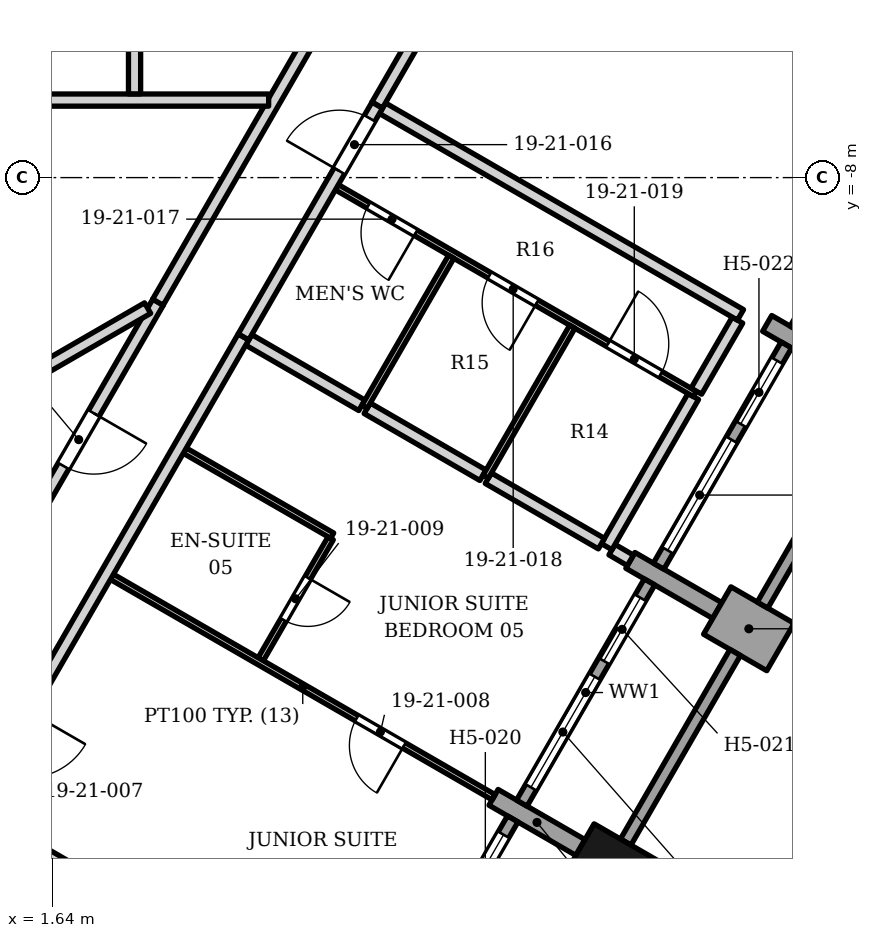
"""IFC4 building model, lengths in metres.
Left out: names, types, materials, properties, quantities, classifications, styles, units other than length and angle.
Written with IfcOpenShell. Run it as: python <this file> out.ifc"""

import sys

from ifc_helpers import new_model, si_unit, direction, frame, frame_2d, origin, origin_2d, place, context, subcontext, project, spatial, polyline, rectangle, outline, extrude, element, fill, save


model = new_model("IFC4")
c1 = context("Model", 3, precision=1e-05, world=origin(), true_north=direction((0.0, 1.0)))
c2 = subcontext(c1, "Body", "Model", "MODEL_VIEW")
j1 = project(units=[si_unit("LENGTHUNIT", "METRE"), si_unit("PLANEANGLEUNIT", "RADIAN")], contexts=[c1])
p1 = place(None, origin())
s1 = spatial("IfcSite", under=j1, at=p1, CompositionType="ELEMENT")
p2 = place(p1, origin())
s2 = spatial("IfcBuilding", under=s1, at=p2, CompositionType="ELEMENT")
p3 = place(p2, frame((0.0, 0.0, 91.8)))
s3 = spatial("IfcBuildingStorey", under=s2, at=p3, CompositionType="ELEMENT", Elevation=91.8)
p4 = place(p3, frame((10.847, -19.317, 0.0), z_axis=(0.0, 0.0, 1.0), x_axis=(0.5, 0.866025403784, 0.0)))
e1 = element("IfcColumn", 1, at=p4, inside=s3, PredefinedType="COLUMN", context=c2, shape_type="SweptSolid", body=[
    extrude(rectangle(XDim=0.9, YDim=1.2, at=origin_2d()), origin(), (0.0, 0.0, 1.0), 3.4),
])
p5 = place(p3, frame((8.899, -18.192, 0.0), z_axis=(0.0, 0.0, 1.0), x_axis=(0.866067297121, -0.499927431592, 0.0)))
e2 = element("IfcWall", 2, at=p5, inside=s3, PredefinedType="SOLIDWALL", context=c2, shape_type="SweptSolid", body=[
    extrude(rectangle(XDim=1.65, YDim=0.3, at=frame_2d((0.825, 0.0))), origin(), (0.0, 0.0, 1.0), 2.65),
])
p6 = place(p3, frame((12.578, -15.12, 0.0), z_axis=(0.0, 0.0, 1.0), x_axis=(0.866006032174, -0.500033551112, 0.0)))
e3 = element("IfcWall", 3, at=p6, inside=s3, PredefinedType="SOLIDWALL", context=c2, shape_type="SweptSolid", body=[
    extrude(rectangle(XDim=1.2, YDim=0.9, at=frame_2d((0.6, 0.0))), origin(), (0.0, 0.0, 1.0), 2.63),
])
p7 = place(p3, frame((12.578, -15.12, 0.0), z_axis=(0.0, 0.0, 1.0), x_axis=(-0.866040211805, 0.499974350878, 0.0)))
e4 = element("IfcWall", 4, at=p7, inside=s3, PredefinedType="SOLIDWALL", context=c2, shape_type="SweptSolid", body=[
    extrude(rectangle(XDim=1.65, YDim=0.3, at=frame_2d((0.825, 0.0))), origin(), (0.0, 0.0, 1.0), 2.65),
])
p8 = place(p3, frame((13.399, -10.397, 0.0), z_axis=(0.0, 0.0, 1.0), x_axis=(0.866003217194, -0.500038426333, 0.0)))
e5 = element("IfcWall", 5, at=p8, inside=s3, PredefinedType="SOLIDWALL", context=c2, shape_type="SweptSolid", body=[
    extrude(rectangle(XDim=1.65, YDim=0.3, at=frame_2d((0.825, 0.0))), origin(), (0.0, 0.0, 1.0), 2.384),
])
p9 = place(p3, frame((7.114, -22.184, 0.0), z_axis=(0.0, 0.0, 1.0), x_axis=(0.500002543286, 0.866023935413, 0.0)))
e6 = element("IfcWall", 6, at=p9, inside=s3, PredefinedType="ELEMENTEDWALL", context=c2, shape_type="SweptSolid", body=[
    extrude(rectangle(XDim=4.2, YDim=0.2, at=frame_2d((2.1, 0.0))), origin(), (0.0, 0.0, 1.0), 2.65),
])
p10 = place(p9, frame((0.3, 0.0, 0.6)))
e7 = element("IfcOpeningElement", 7, at=p10, cuts=e6, PredefinedType="OPENING", context=c2, shape_type="SweptSolid", body=[
    extrude(rectangle(XDim=2.1, YDim=1.8, at=frame_2d((1.05, 0.9))), frame((0.0, 0.11, 0.0), z_axis=(0.0, -1.0, 0.0), x_axis=(1.0, 0.0, 0.0)), (0.0, 0.0, 1.0), 0.22),
])
p11 = place(p9, frame((2.7, 0.0, 0.0)))
e8 = element("IfcOpeningElement", 8, at=p11, cuts=e6, PredefinedType="OPENING", context=c2, shape_type="SweptSolid", body=[
    extrude(rectangle(XDim=1.2, YDim=2.4, at=frame_2d((0.6, 1.2))), frame((0.0, 0.11, 0.0), z_axis=(0.0, -1.0, 0.0), x_axis=(1.0, 0.0, 0.0)), (0.0, 0.0, 1.0), 0.22),
])
p12 = place(p3, frame((11.073, -18.927, 0.0), z_axis=(0.0, 0.0, 1.0), x_axis=(0.500012057535, 0.866018442252, 0.0)))
e9 = element("IfcWall", 9, at=p12, inside=s3, PredefinedType="SOLIDWALL", context=c2, shape_type="SweptSolid", body=[
    extrude(rectangle(XDim=3.6, YDim=0.2, at=frame_2d((1.8, 0.0))), origin(), (0.0, 0.0, 1.0), 2.63),
])
p13 = place(p3, frame((9.364, -18.287, 0.0), z_axis=(0.0, 0.0, 1.0), x_axis=(0.500027713859, 0.866009402589, 0.0)))
e10 = element("IfcWall", 10, at=p13, inside=s3, PredefinedType="ELEMENTEDWALL", context=c2, shape_type="SweptSolid", body=[
    extrude(rectangle(XDim=4.2, YDim=0.2, at=frame_2d((2.1, 0.0))), origin(), (0.0, 0.0, 1.0), 2.65),
])
p14 = place(p13, frame((0.3, 0.0, 0.6)))
e11 = element("IfcOpeningElement", 11, at=p14, cuts=e10, PredefinedType="OPENING", context=c2, shape_type="SweptSolid", body=[
    extrude(rectangle(XDim=2.1, YDim=1.8, at=frame_2d((1.05, 0.9))), frame((0.0, 0.11, 0.0), z_axis=(0.0, -1.0, 0.0), x_axis=(1.0, 0.0, 0.0)), (0.0, 0.0, 1.0), 0.22),
])
p15 = place(p13, frame((2.7, 0.0, 0.0)))
e12 = element("IfcOpeningElement", 12, at=p15, cuts=e10, PredefinedType="OPENING", context=c2, shape_type="SweptSolid", body=[
    extrude(rectangle(XDim=1.2, YDim=2.4, at=frame_2d((0.6, 1.2))), frame((0.0, 0.11, 0.0), z_axis=(0.0, -1.0, 0.0), x_axis=(1.0, 0.0, 0.0)), (0.0, 0.0, 1.0), 0.22),
])
p16 = place(p3, origin())
e13 = element("IfcWall", 13, at=p16, inside=s3, PredefinedType="SOLIDWALL", context=c2, shape_type="SweptSolid", body=[
    extrude(outline(polyline([(13.409, -15.08), (15.209, -11.963), (15.036, -11.863), (13.236, -14.98), (13.409, -15.08)])), origin(), (0.0, 0.0, 1.0), 2.63),
])
p17 = place(p3, frame((11.614, -14.39, 0.0), z_axis=(0.0, 0.0, 1.0), x_axis=(0.500027713859, 0.866009402589, 0.0)))
e14 = element("IfcWall", 14, at=p17, inside=s3, PredefinedType="ELEMENTEDWALL", context=c2, shape_type="SweptSolid", body=[
    extrude(rectangle(XDim=4.2, YDim=0.2, at=frame_2d((2.1, 0.0))), origin(), (0.0, 0.0, 1.0), 2.302),
])
p18 = place(p17, frame((0.3, 0.0, 0.6)))
e15 = element("IfcOpeningElement", 15, at=p18, cuts=e14, PredefinedType="OPENING", context=c2, shape_type="SweptSolid", body=[
    extrude(rectangle(XDim=2.1, YDim=1.6, at=frame_2d((1.05, 0.8))), frame((0.0, 0.11, 0.0), z_axis=(0.0, -1.0, 0.0), x_axis=(1.0, 0.0, 0.0)), (0.0, 0.0, 1.0), 0.22),
])
p19 = place(p17, frame((2.7, 0.0, 0.0)))
e16 = element("IfcOpeningElement", 16, at=p19, cuts=e14, PredefinedType="OPENING", context=c2, shape_type="SweptSolid", body=[
    extrude(rectangle(XDim=1.2, YDim=2.2, at=frame_2d((0.6, 1.1))), frame((0.0, 0.11, 0.0), z_axis=(0.0, -1.0, 0.0), x_axis=(1.0, 0.0, 0.0)), (0.0, 0.0, 1.0), 0.22),
])
p20 = place(p3, frame((13.864, -10.493, 0.0), z_axis=(0.0, 0.0, 1.0), x_axis=(0.500002543286, 0.866023935413, 0.0)))
e17 = element("IfcWall", 17, at=p20, inside=s3, PredefinedType="ELEMENTEDWALL", context=c2, shape_type="SweptSolid", body=[
    extrude(rectangle(XDim=4.2, YDim=0.2, at=frame_2d((2.1, 0.0))), origin(), (0.0, 0.0, 1.0), 2.65),
])
p21 = place(p3, frame((0.37, -18.466, 0.0), z_axis=(0.0, 0.0, 1.0), x_axis=(0.866027438349, -0.499996476014, 0.0)))
e18 = element("IfcWall", 18, at=p21, inside=s3, PredefinedType="PARTITIONING", context=c2, shape_type="SweptSolid", body=[
    extrude(rectangle(XDim=7.25, YDim=0.2, at=frame_2d((3.625, 0.0))), origin(), (0.0, 0.0, 1.0), 2.552),
])
p22 = place(p3, frame((5.07, -15.921, 0.0), z_axis=(0.0, 0.0, 1.0), x_axis=(0.500697021662, 0.865622603967, 0.0)))
e19 = element("IfcWall", 19, at=p22, inside=s3, PredefinedType="PARTITIONING", context=c2, shape_type="SweptSolid", body=[
    extrude(rectangle(XDim=2.298, YDim=0.1, at=frame_2d((1.149, 0.0))), origin(), (0.0, 0.0, 1.0), 3.23),
])
p23 = place(p22, frame((0.748, 0.0, 0.0)))
e20 = element("IfcOpeningElement", 20, at=p23, cuts=e19, PredefinedType="OPENING", context=c2, shape_type="SweptSolid", body=[
    extrude(rectangle(XDim=0.8, YDim=2.1, at=frame_2d((0.4, 1.05))), frame((0.0, 0.06, 0.0), z_axis=(0.0, -1.0, 0.0), x_axis=(1.0, 0.0, 0.0)), (0.0, 0.0, 1.0), 0.12),
])
p24 = place(p3, frame((0.119, -15.698, 0.0), z_axis=(0.0, 0.0, 1.0), x_axis=(0.499994537821, 0.866028557352, 0.0)))
e21 = element("IfcWall", 21, at=p24, inside=s3, PredefinedType="PARTITIONING", context=c2, shape_type="SweptSolid", body=[
    extrude(rectangle(XDim=6.524, YDim=0.2, at=frame_2d((3.262, 0.0))), origin(), (0.0, 0.0, 1.0), 2.302),
])
p25 = place(p24, frame((3.413, 0.0, 0.0)))
e22 = element("IfcOpeningElement", 22, at=p25, cuts=e21, PredefinedType="OPENING", context=c2, shape_type="SweptSolid", body=[
    extrude(rectangle(XDim=1.0, YDim=2.1, at=frame_2d((0.5, 1.05))), frame((0.0, 0.11, 0.0), z_axis=(0.0, -1.0, 0.0), x_axis=(1.0, 0.0, 0.0)), (0.0, 0.0, 1.0), 0.22),
])
p26 = place(p3, frame((2.621, -14.565, 0.0), z_axis=(0.0, 0.0, 1.0), x_axis=(0.866035857012, -0.499981894041, 0.0)))
e23 = element("IfcWall", 23, at=p26, inside=s3, PredefinedType="PARTITIONING", context=c2, shape_type="SweptSolid", body=[
    extrude(rectangle(XDim=7.25, YDim=0.1, at=frame_2d((3.625, 0.0))), origin(), (0.0, 0.0, 1.0), 2.552),
])
p27 = place(p26, frame((4.65, 0.0, 0.0)))
e24 = element("IfcOpeningElement", 24, at=p27, cuts=e23, PredefinedType="OPENING", context=c2, shape_type="SweptSolid", body=[
    extrude(rectangle(XDim=0.9, YDim=2.1, at=frame_2d((0.45, 1.05))), frame((0.0, 0.06, 0.0), z_axis=(0.0, -1.0, 0.0), x_axis=(1.0, 0.0, 0.0)), (0.0, 0.0, 1.0), 0.12),
])
p28 = place(p3, frame((10.847, -14.118, 0.0), z_axis=(0.0, 0.0, 1.0), x_axis=(0.864133115814, -0.503263308968, 0.0)))
e25 = element("IfcWall", 25, at=p28, inside=s3, PredefinedType="PARTITIONING", context=c2, shape_type="SweptSolid", body=[
    extrude(rectangle(XDim=0.35, YDim=0.2, at=frame_2d((0.175, 0.0))), origin(), (0.0, 0.0, 1.0), 3.23),
])
p29 = place(p3, frame((10.759, -14.07, 0.0), z_axis=(0.0, 0.0, 1.0), x_axis=(0.499472906963, 0.866329507295, 0.0)))
e26 = element("IfcWall", 26, at=p29, inside=s3, PredefinedType="PARTITIONING", context=c2, shape_type="SweptSolid", body=[
    extrude(rectangle(XDim=2.852, YDim=0.2, at=frame_2d((1.426, 0.0))), origin(), (0.0, 0.0, 1.0), 2.302),
])
p30 = place(p3, frame((3.82, -12.49, 0.0), z_axis=(0.0, 0.0, 1.0), x_axis=(0.866326367614, -0.499478352661, 0.0)))
e27 = element("IfcWall", 27, at=p30, inside=s3, PredefinedType="PARTITIONING", context=c2, shape_type="SweptSolid", body=[
    extrude(rectangle(XDim=2.8, YDim=0.1, at=frame_2d((1.4, 0.0))), origin(), (0.0, 0.0, 1.0), 2.552),
])
p31 = place(p3, frame((8.812, -12.943, 0.0), z_axis=(0.0, 0.0, 1.0), x_axis=(0.86565946566, -0.500633288458, 0.0)))
e28 = element("IfcWall", 28, at=p31, inside=s3, PredefinedType="PARTITIONING", context=c2, shape_type="SweptSolid", body=[
    extrude(rectangle(XDim=2.15, YDim=0.2, at=frame_2d((1.075, 0.0))), origin(), (0.0, 0.0, 1.0), 2.782),
])
p32 = place(p3, frame((6.82, -11.793, 0.0), z_axis=(0.0, 0.0, 1.0), x_axis=(0.865656676501, -0.500638111243, 0.0)))
e29 = element("IfcWall", 29, at=p32, inside=s3, PredefinedType="PARTITIONING", context=c2, shape_type="SweptSolid", body=[
    extrude(rectangle(XDim=2.2, YDim=0.2, at=frame_2d((1.1, 0.0))), origin(), (0.0, 0.0, 1.0), 2.302),
])
p33 = place(p3, frame((6.322, -8.159, 0.0), z_axis=(0.0, 0.0, 1.0), x_axis=(0.866028893315, -0.499993955907, 0.0)))
e30 = element("IfcWall", 30, at=p33, inside=s3, PredefinedType="PARTITIONING", context=c2, shape_type="SweptSolid", body=[
    extrude(rectangle(XDim=6.798, YDim=0.1, at=frame_2d((3.399, 0.0))), origin(), (0.0, 0.0, 1.0), 2.552),
])
p34 = place(p33, frame((0.598, 0.0, 0.0)))
e31 = element("IfcOpeningElement", 31, at=p34, cuts=e30, PredefinedType="OPENING", context=c2, shape_type="SweptSolid", body=[
    extrude(rectangle(XDim=0.9, YDim=2.1, at=frame_2d((0.45, 1.05))), frame((0.0, 0.06, 0.0), z_axis=(0.0, -1.0, 0.0), x_axis=(1.0, 0.0, 0.0)), (0.0, 0.0, 1.0), 0.12),
])
p35 = place(p33, frame((2.898, 0.0, 0.0)))
e32 = element("IfcOpeningElement", 32, at=p35, cuts=e30, PredefinedType="OPENING", context=c2, shape_type="SweptSolid", body=[
    extrude(rectangle(XDim=0.9, YDim=2.1, at=frame_2d((0.45, 1.05))), frame((0.0, 0.06, 0.0), z_axis=(0.0, -1.0, 0.0), x_axis=(1.0, 0.0, 0.0)), (0.0, 0.0, 1.0), 0.12),
])
p36 = place(p33, frame((5.148, 0.0, 0.0)))
e33 = element("IfcOpeningElement", 33, at=p36, cuts=e30, PredefinedType="OPENING", context=c2, shape_type="SweptSolid", body=[
    extrude(rectangle(XDim=1.0, YDim=2.1, at=frame_2d((0.5, 1.05))), frame((0.0, 0.06, 0.0), z_axis=(0.0, -1.0, 0.0), x_axis=(1.0, 0.0, 0.0)), (0.0, 0.0, 1.0), 0.12),
])
p37 = place(p3, frame((0.8, -11.538, 0.0), z_axis=(0.0, 0.0, 1.0), x_axis=(0.865884499667, 0.500243973713, 0.0)))
e34 = element("IfcWall", 34, at=p37, inside=s3, PredefinedType="PARTITIONING", context=c2, shape_type="SweptSolid", body=[
    extrude(rectangle(XDim=2.782, YDim=0.2, at=frame_2d((1.391, 0.0))), origin(), (0.0, 0.0, 1.0), 3.23),
])
p38 = place(p3, frame((12.234, -11.512, 0.0), z_axis=(0.0, 0.0, 1.0), x_axis=(0.501000622125, 0.865446923058, 0.0)))
e35 = element("IfcWall", 35, at=p38, inside=s3, PredefinedType="PARTITIONING", context=c2, shape_type="SweptSolid", body=[
    extrude(rectangle(XDim=1.35, YDim=0.2, at=frame_2d((0.675, 0.0))), origin(), (0.0, 0.0, 1.0), 3.23),
])
p39 = place(p3, frame((4.873, -10.669, 0.0), z_axis=(0.0, 0.0, 1.0), x_axis=(0.865664803183, -0.500624059081, 0.0)))
e36 = element("IfcWall", 36, at=p39, inside=s3, PredefinedType="PARTITIONING", context=c2, shape_type="SweptSolid", body=[
    extrude(rectangle(XDim=2.148, YDim=0.2, at=frame_2d((1.074, 0.0))), origin(), (0.0, 0.0, 1.0), 3.23),
])
p40 = place(p3, frame((0.285, -18.415, 0.0), z_axis=(0.0, 0.0, 1.0), x_axis=(0.5000018851, 0.866024315419, 0.0)))
e37 = element("IfcWall", 37, at=p40, inside=s3, PredefinedType="PARTITIONING", context=c2, shape_type="SweptSolid", body=[
    extrude(rectangle(XDim=9.0, YDim=0.2, at=frame_2d((4.5, 0.0))), origin(), (0.0, 0.0, 1.0), 2.302),
])
p41 = place(p40, frame((0.8, 0.0, 0.0)))
e38 = element("IfcOpeningElement", 38, at=p41, cuts=e37, PredefinedType="OPENING", context=c2, shape_type="SweptSolid", body=[
    extrude(rectangle(XDim=1.1, YDim=2.1, at=frame_2d((0.55, 1.05))), frame((0.0, 0.11, 0.0), z_axis=(0.0, -1.0, 0.0), x_axis=(1.0, 0.0, 0.0)), (0.0, 0.0, 1.0), 0.22),
])
p42 = place(p3, frame((8.769, -12.92, 0.0), z_axis=(0.0, 0.0, 1.0), x_axis=(0.499972122318, 0.866041498374, 0.0)))
e39 = element("IfcWall", 39, at=p42, inside=s3, PredefinedType="PARTITIONING", context=c2, shape_type="SweptSolid", body=[
    extrude(rectangle(XDim=2.85, YDim=0.1, at=frame_2d((1.425, 0.0))), origin(), (0.0, 0.0, 1.0), 2.302),
])
p43 = place(p3, frame((7.072, -6.86, 0.0), z_axis=(0.0, 0.0, 1.0), x_axis=(0.86615808173, -0.499770124611, 0.0)))
e40 = element("IfcWall", 40, at=p43, inside=s3, PredefinedType="PARTITIONING", context=c2, shape_type="SweptSolid", body=[
    extrude(rectangle(XDim=6.798, YDim=0.2, at=frame_2d((3.399, 0.0))), origin(), (0.0, 0.0, 1.0), 2.552),
])
p44 = place(p3, frame((3.379, -10.049, 0.0), z_axis=(0.0, 0.0, 1.0), x_axis=(0.50000242408, 0.866024004237, 0.0)))
e41 = element("IfcWall", 41, at=p44, inside=s3, PredefinedType="PARTITIONING", context=c2, shape_type="SweptSolid", body=[
    extrude(rectangle(XDim=15.877, YDim=0.2, at=frame_2d((7.938, 0.0))), origin(), (0.0, 0.0, 1.0), 2.384),
])
p45 = place(p44, frame((9.359, 0.0, 0.0)))
e42 = element("IfcOpeningElement", 42, at=p45, cuts=e41, PredefinedType="OPENING", context=c2, shape_type="SweptSolid", body=[
    extrude(rectangle(XDim=1.0, YDim=2.1, at=frame_2d((0.5, 1.05))), frame((0.0, 0.11, 0.0), z_axis=(0.0, -1.0, 0.0), x_axis=(1.0, 0.0, 0.0)), (0.0, 0.0, 1.0), 0.22),
])
p46 = place(p3, frame((6.777, -11.771, 0.0), z_axis=(0.0, 0.0, 1.0), x_axis=(0.499972122318, 0.866041498374, 0.0)))
e43 = element("IfcWall", 43, at=p46, inside=s3, PredefinedType="PARTITIONING", context=c2, shape_type="SweptSolid", body=[
    extrude(rectangle(XDim=2.85, YDim=0.1, at=frame_2d((1.425, 0.0))), origin(), (0.0, 0.0, 1.0), 3.23),
])
p47 = place(p3, frame((6.985, -6.807, 0.0), z_axis=(0.0, 0.0, 1.0), x_axis=(0.500170742348, 0.865926803199, 0.0)))
e44 = element("IfcWall", 44, at=p47, inside=s3, PredefinedType="PARTITIONING", context=c2, shape_type="SweptSolid", body=[
    extrude(rectangle(XDim=9.098, YDim=0.2, at=frame_2d((4.549, 0.0))), origin(), (0.0, 0.0, 1.0), 2.552),
])
p48 = place(p47, frame((4.098, 0.0, 0.0)))
e45 = element("IfcOpeningElement", 45, at=p48, cuts=e44, PredefinedType="OPENING", context=c2, shape_type="SweptSolid", body=[
    extrude(rectangle(XDim=1.0, YDim=2.1, at=frame_2d((0.5, 1.05))), frame((0.0, 0.11, 0.0), z_axis=(0.0, -1.0, 0.0), x_axis=(1.0, 0.0, 0.0)), (0.0, 0.0, 1.0), 0.22),
])
p49 = place(p3, frame((4.786, -10.619, 0.0), z_axis=(0.0, 0.0, 1.0), x_axis=(0.500007539231, 0.866021050964, 0.0)))
e46 = element("IfcWall", 46, at=p49, inside=s3, PredefinedType="PARTITIONING", context=c2, shape_type="SweptSolid", body=[
    extrude(rectangle(XDim=4.398, YDim=0.2, at=frame_2d((2.199, 0.0))), origin(), (0.0, 0.0, 1.0), 3.23),
])
p50 = place(p49, frame((3.15, 0.0, 0.0)))
e47 = element("IfcOpeningElement", 47, at=p50, cuts=e46, PredefinedType="OPENING", context=c2, shape_type="SweptSolid", body=[
    extrude(rectangle(XDim=1.0, YDim=2.1, at=frame_2d((0.5, 1.05))), frame((0.0, 0.11, 0.0), z_axis=(0.0, -1.0, 0.0), x_axis=(1.0, 0.0, 0.0)), (0.0, 0.0, 1.0), 0.22),
])
p51 = place(p3, frame((-5.061, -6.725, 0.0), z_axis=(0.0, 0.0, 1.0), x_axis=(1.0, 0.0, 0.0)))
e48 = element("IfcWall", 48, at=p51, inside=s3, PredefinedType="PARTITIONING", context=c2, shape_type="SweptSolid", body=[
    extrude(rectangle(XDim=10.261, YDim=0.2, at=frame_2d((5.13, 0.0))), origin(), (0.0, 0.0, 1.0), 2.384),
])
p52 = place(p3, frame((2.994, -6.623, 0.0), z_axis=(0.0, 0.0, 1.0), x_axis=(0.000215209959, 0.999999976842, 0.0)))
e49 = element("IfcWall", 49, at=p52, inside=s3, PredefinedType="PARTITIONING", context=c2, shape_type="SweptSolid", body=[
    extrude(rectangle(XDim=9.075, YDim=0.2, at=frame_2d((4.538, 0.0))), origin(), (0.0, 0.0, 1.0), 3.23),
])
p53 = place(p11, origin())
e50 = element("IfcDoor", 50, at=p53, inside=s3, OperationType="SINGLE_SWING_LEFT", PredefinedType="DOOR", context=c2, shape_type="SweptSolid", body=[
    extrude(rectangle(XDim=1.2, YDim=2.4, at=frame_2d((0.6, 1.2))), frame((0.0, 0.025, 0.0), z_axis=(0.0, -1.0, 0.0), x_axis=(1.0, 0.0, 0.0)), (0.0, 0.0, 1.0), 0.05),
])
fill(e8, e50)
p54 = place(p14, origin())
e51 = element("IfcWindow", 51, at=p54, inside=s3, PartitioningType="SINGLE_PANEL", PredefinedType="WINDOW", context=c2, shape_type="SweptSolid", body=[
    extrude(rectangle(XDim=2.1, YDim=1.8, at=frame_2d((1.05, 0.9))), frame((0.0, 0.03, 0.0), z_axis=(0.0, -1.0, 0.0), x_axis=(1.0, 0.0, 0.0)), (0.0, 0.0, 1.0), 0.06),
])
fill(e11, e51)
p55 = place(p15, origin())
e52 = element("IfcDoor", 52, at=p55, inside=s3, OperationType="SINGLE_SWING_LEFT", PredefinedType="DOOR", context=c2, shape_type="SweptSolid", body=[
    extrude(rectangle(XDim=1.2, YDim=2.4, at=frame_2d((0.6, 1.2))), frame((0.0, 0.025, 0.0), z_axis=(0.0, -1.0, 0.0), x_axis=(1.0, 0.0, 0.0)), (0.0, 0.0, 1.0), 0.05),
])
fill(e12, e52)
p56 = place(p18, origin())
e53 = element("IfcWindow", 53, at=p56, inside=s3, PartitioningType="SINGLE_PANEL", PredefinedType="WINDOW", context=c2, shape_type="SweptSolid", body=[
    extrude(rectangle(XDim=2.1, YDim=1.6, at=frame_2d((1.05, 0.8))), frame((0.0, 0.03, 0.0), z_axis=(0.0, -1.0, 0.0), x_axis=(1.0, 0.0, 0.0)), (0.0, 0.0, 1.0), 0.06),
])
fill(e15, e53)
p57 = place(p19, origin())
e54 = element("IfcDoor", 54, at=p57, inside=s3, OperationType="SINGLE_SWING_LEFT", PredefinedType="DOOR", context=c2, shape_type="SweptSolid", body=[
    extrude(rectangle(XDim=1.2, YDim=2.2, at=frame_2d((0.6, 1.1))), frame((0.0, 0.025, 0.0), z_axis=(0.0, -1.0, 0.0), x_axis=(1.0, 0.0, 0.0)), (0.0, 0.0, 1.0), 0.05),
])
fill(e16, e54)
p58 = place(p27, origin())
e55 = element("IfcDoor", 55, at=p58, inside=s3, OperationType="SINGLE_SWING_RIGHT", PredefinedType="DOOR", context=c2, shape_type="SweptSolid", body=[
    extrude(rectangle(XDim=0.9, YDim=2.1, at=frame_2d((0.45, 1.05))), frame((0.0, 0.025, 0.0), z_axis=(0.0, -1.0, 0.0), x_axis=(1.0, 0.0, 0.0)), (0.0, 0.0, 1.0), 0.05),
])
fill(e24, e55)
p59 = place(p23, origin())
e56 = element("IfcDoor", 56, at=p59, inside=s3, OperationType="SINGLE_SWING_RIGHT", PredefinedType="DOOR", context=c2, shape_type="SweptSolid", body=[
    extrude(rectangle(XDim=0.8, YDim=2.1, at=frame_2d((0.4, 1.05))), frame((0.0, 0.025, 0.0), z_axis=(0.0, -1.0, 0.0), x_axis=(1.0, 0.0, 0.0)), (0.0, 0.0, 1.0), 0.05),
])
fill(e20, e56)
p60 = place(p25, origin())
e57 = element("IfcDoor", 57, at=p60, inside=s3, OperationType="SINGLE_SWING_RIGHT", PredefinedType="DOOR", context=c2, shape_type="SweptSolid", body=[
    extrude(rectangle(XDim=1.0, YDim=2.1, at=frame_2d((0.5, 1.05))), frame((0.0, 0.025, 0.0), z_axis=(0.0, -1.0, 0.0), x_axis=(1.0, 0.0, 0.0)), (0.0, 0.0, 1.0), 0.05),
])
fill(e22, e57)
p61 = place(p50, origin())
e58 = element("IfcDoor", 58, at=p61, inside=s3, OperationType="SINGLE_SWING_LEFT", PredefinedType="DOOR", context=c2, shape_type="SweptSolid", body=[
    extrude(rectangle(XDim=1.0, YDim=2.1, at=frame_2d((0.5, 1.05))), frame((0.0, 0.025, 0.0), z_axis=(0.0, -1.0, 0.0), x_axis=(1.0, 0.0, 0.0)), (0.0, 0.0, 1.0), 0.05),
])
fill(e47, e58)
p62 = place(p34, origin())
e59 = element("IfcDoor", 59, at=p62, inside=s3, OperationType="SINGLE_SWING_RIGHT", PredefinedType="DOOR", context=c2, shape_type="SweptSolid", body=[
    extrude(rectangle(XDim=0.9, YDim=2.1, at=frame_2d((0.45, 1.05))), frame((0.0, 0.025, 0.0), z_axis=(0.0, -1.0, 0.0), x_axis=(1.0, 0.0, 0.0)), (0.0, 0.0, 1.0), 0.05),
])
fill(e31, e59)
p63 = place(p35, origin())
e60 = element("IfcDoor", 60, at=p63, inside=s3, OperationType="SINGLE_SWING_RIGHT", PredefinedType="DOOR", context=c2, shape_type="SweptSolid", body=[
    extrude(rectangle(XDim=0.9, YDim=2.1, at=frame_2d((0.45, 1.05))), frame((0.0, 0.025, 0.0), z_axis=(0.0, -1.0, 0.0), x_axis=(1.0, 0.0, 0.0)), (0.0, 0.0, 1.0), 0.05),
])
fill(e32, e60)
p64 = place(p36, origin())
e61 = element("IfcDoor", 61, at=p64, inside=s3, OperationType="SINGLE_SWING_LEFT", PredefinedType="DOOR", context=c2, shape_type="SweptSolid", body=[
    extrude(rectangle(XDim=1.0, YDim=2.1, at=frame_2d((0.5, 1.05))), frame((0.0, 0.025, 0.0), z_axis=(0.0, -1.0, 0.0), x_axis=(1.0, 0.0, 0.0)), (0.0, 0.0, 1.0), 0.05),
])
fill(e33, e61)
save(model, sys.argv[1])
